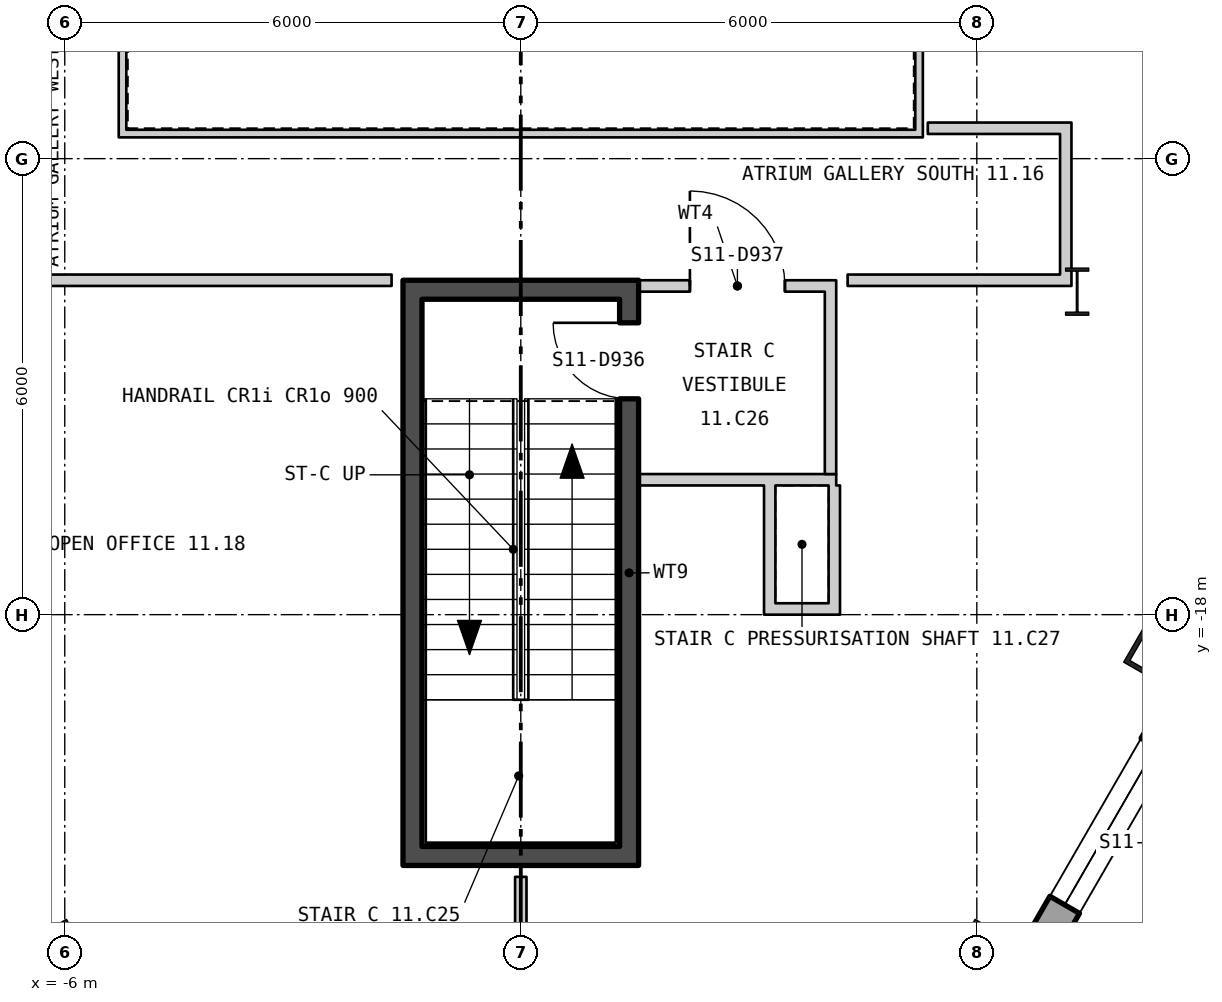
"""IFC4 building model, lengths in metres.
Left out: names, types, materials, properties, quantities, classifications, styles, units other than length and angle.
Written with IfcOpenShell. Run it as: python <this file> out.ifc"""

import sys

from ifc_helpers import new_model, si_unit, direction, frame, frame_2d, origin, origin_2d, place, context, subcontext, project, spatial, polyline, rectangle, hollow_rectangle, i_section, outline, extrude, element, fill, save


model = new_model("IFC4")
c1 = context("Model", 3, precision=1e-05, world=origin(), true_north=direction((0.0, 1.0)))
c2 = subcontext(c1, "Body", "Model", "MODEL_VIEW")
j1 = project(units=[si_unit("LENGTHUNIT", "METRE"), si_unit("PLANEANGLEUNIT", "RADIAN")], contexts=[c1])
p1 = place(None, origin())
s1 = spatial("IfcSite", under=j1, at=p1, CompositionType="ELEMENT")
p2 = place(p1, origin())
s2 = spatial("IfcBuilding", under=s1, at=p2, CompositionType="ELEMENT")
p3 = place(p2, frame((0.0, 0.0, 151.5)))
s3 = spatial("IfcBuildingStorey", under=s2, at=p3, CompositionType="ELEMENT", Elevation=151.5)
for number, where, z_axis, x_axis in (
    (1, (-6.131, -22.443, 0.0), (0.0, 0.0, 1.0), (0.5, -0.866, 0.0)),
    (2, (6.131, -22.443, 0.0), (0.0, 0.0, 1.0), (0.5, 0.866, 0.0)),
    (3, (8.385, -18.54, 0.0), (0.0, 0.0, 1.0), (0.5, 0.866, 0.0)),
):
    element("IfcColumn", number, at=place(p3, frame(where, z_axis=z_axis, x_axis=x_axis)), inside=s3, PredefinedType="COLUMN", context=c2, shape_type="SweptSolid", body=[
        extrude(hollow_rectangle(XDim=0.6, YDim=0.7, WallThickness=0.06, at=origin_2d()), origin(), (0.0, 0.0, 1.0), 3.9),
    ])
p4 = place(p3, frame((7.32, -13.75, 0.0), z_axis=(0.0, 0.0, 1.0), x_axis=(1.0, 0.0, 0.0)))
e4 = element("IfcColumn", 4, at=p4, inside=s3, PredefinedType="COLUMN", context=c2, shape_type="SweptSolid", body=[
    extrude(i_section(OverallWidth=0.305, OverallDepth=0.62, WebThickness=0.021, FlangeThickness=0.04, at=origin_2d()), origin(), (0.0, 0.0, 1.0), 3.9),
])
p5 = place(p3, frame((-27.075, 12.683, -0.18), z_axis=(0.0, 0.0, 1.0), x_axis=(0.500000141277, -0.866025322218, 0.0)))
e5 = element("IfcWall", 5, at=p5, inside=s3, PredefinedType="SOLIDWALL", context=c2, shape_type="SweptSolid", body=[
    extrude(outline(polyline([(-0.13, -0.225), (45.86, -0.225), (45.6, 0.225), (0.13, 0.225), (-0.13, -0.225)])), origin(), (0.0, 0.0, 1.0), 3.68),
])
p6 = place(p5, frame((1.424, 0.0, 1.08)))
e6 = element("IfcOpeningElement", 6, at=p6, cuts=e5, PredefinedType="OPENING", context=c2, shape_type="SweptSolid", body=[
    extrude(rectangle(XDim=2.4, YDim=2.0, at=frame_2d((1.2, 1.0))), frame((0.0, 0.235, 0.0), z_axis=(0.0, -1.0, 0.0), x_axis=(1.0, 0.0, 0.0)), (0.0, 0.0, 1.0), 0.47),
])
p7 = place(p5, frame((5.892, 0.0, 1.08)))
e7 = element("IfcOpeningElement", 7, at=p7, cuts=e5, PredefinedType="OPENING", context=c2, shape_type="SweptSolid", body=[
    extrude(rectangle(XDim=2.4, YDim=2.0, at=frame_2d((1.2, 1.0))), frame((0.0, 0.235, 0.0), z_axis=(0.0, -1.0, 0.0), x_axis=(1.0, 0.0, 0.0)), (0.0, 0.0, 1.0), 0.47),
])
p8 = place(p5, frame((10.399, 0.0, 1.08)))
e8 = element("IfcOpeningElement", 8, at=p8, cuts=e5, PredefinedType="OPENING", context=c2, shape_type="SweptSolid", body=[
    extrude(rectangle(XDim=2.4, YDim=2.0, at=frame_2d((1.2, 1.0))), frame((0.0, 0.235, 0.0), z_axis=(0.0, -1.0, 0.0), x_axis=(1.0, 0.0, 0.0)), (0.0, 0.0, 1.0), 0.47),
])
p9 = place(p5, frame((14.905, 0.0, 1.08)))
e9 = element("IfcOpeningElement", 9, at=p9, cuts=e5, PredefinedType="OPENING", context=c2, shape_type="SweptSolid", body=[
    extrude(rectangle(XDim=2.4, YDim=2.0, at=frame_2d((1.2, 1.0))), frame((0.0, 0.235, 0.0), z_axis=(0.0, -1.0, 0.0), x_axis=(1.0, 0.0, 0.0)), (0.0, 0.0, 1.0), 0.47),
])
p10 = place(p5, frame((19.412, 0.0, 1.08)))
e10 = element("IfcOpeningElement", 10, at=p10, cuts=e5, PredefinedType="OPENING", context=c2, shape_type="SweptSolid", body=[
    extrude(rectangle(XDim=2.4, YDim=2.0, at=frame_2d((1.2, 1.0))), frame((0.0, 0.235, 0.0), z_axis=(0.0, -1.0, 0.0), x_axis=(1.0, 0.0, 0.0)), (0.0, 0.0, 1.0), 0.47),
])
p11 = place(p5, frame((23.918, 0.0, 1.08)))
e11 = element("IfcOpeningElement", 11, at=p11, cuts=e5, PredefinedType="OPENING", context=c2, shape_type="SweptSolid", body=[
    extrude(rectangle(XDim=2.4, YDim=2.0, at=frame_2d((1.2, 1.0))), frame((0.0, 0.235, 0.0), z_axis=(0.0, -1.0, 0.0), x_axis=(1.0, 0.0, 0.0)), (0.0, 0.0, 1.0), 0.47),
])
p12 = place(p5, frame((28.425, 0.0, 1.08)))
e12 = element("IfcOpeningElement", 12, at=p12, cuts=e5, PredefinedType="OPENING", context=c2, shape_type="SweptSolid", body=[
    extrude(rectangle(XDim=2.4, YDim=2.0, at=frame_2d((1.2, 1.0))), frame((0.0, 0.235, 0.0), z_axis=(0.0, -1.0, 0.0), x_axis=(1.0, 0.0, 0.0)), (0.0, 0.0, 1.0), 0.47),
])
p13 = place(p5, frame((32.932, 0.0, 1.08)))
e13 = element("IfcOpeningElement", 13, at=p13, cuts=e5, PredefinedType="OPENING", context=c2, shape_type="SweptSolid", body=[
    extrude(rectangle(XDim=2.4, YDim=2.0, at=frame_2d((1.2, 1.0))), frame((0.0, 0.235, 0.0), z_axis=(0.0, -1.0, 0.0), x_axis=(1.0, 0.0, 0.0)), (0.0, 0.0, 1.0), 0.47),
])
p14 = place(p5, frame((37.438, 0.0, 1.08)))
e14 = element("IfcOpeningElement", 14, at=p14, cuts=e5, PredefinedType="OPENING", context=c2, shape_type="SweptSolid", body=[
    extrude(rectangle(XDim=2.4, YDim=2.0, at=frame_2d((1.2, 1.0))), frame((0.0, 0.235, 0.0), z_axis=(0.0, -1.0, 0.0), x_axis=(1.0, 0.0, 0.0)), (0.0, 0.0, 1.0), 0.47),
])
p15 = place(p5, frame((41.907, 0.0, 1.08)))
e15 = element("IfcOpeningElement", 15, at=p15, cuts=e5, PredefinedType="OPENING", context=c2, shape_type="SweptSolid", body=[
    extrude(rectangle(XDim=2.4, YDim=2.0, at=frame_2d((1.2, 1.0))), frame((0.0, 0.235, 0.0), z_axis=(0.0, -1.0, 0.0), x_axis=(1.0, 0.0, 0.0)), (0.0, 0.0, 1.0), 0.47),
])
p16 = place(p3, frame((4.21, -26.921, -0.18), z_axis=(0.0, 0.0, 1.0), x_axis=(0.500000141277, 0.866025322218, 0.0)))
e16 = element("IfcWall", 16, at=p16, inside=s3, PredefinedType="SOLIDWALL", context=c2, shape_type="SweptSolid", body=[
    extrude(outline(polyline([(-0.13, -0.225), (45.86, -0.225), (45.6, 0.225), (0.13, 0.225), (-0.13, -0.225)])), origin(), (0.0, 0.0, 1.0), 3.68),
])
p17 = place(p16, frame((1.424, 0.0, 1.08)))
e17 = element("IfcOpeningElement", 17, at=p17, cuts=e16, PredefinedType="OPENING", context=c2, shape_type="SweptSolid", body=[
    extrude(rectangle(XDim=2.4, YDim=2.0, at=frame_2d((1.2, 1.0))), frame((0.0, 0.235, 0.0), z_axis=(0.0, -1.0, 0.0), x_axis=(1.0, 0.0, 0.0)), (0.0, 0.0, 1.0), 0.47),
])
p18 = place(p16, frame((5.892, 0.0, 1.08)))
e18 = element("IfcOpeningElement", 18, at=p18, cuts=e16, PredefinedType="OPENING", context=c2, shape_type="SweptSolid", body=[
    extrude(rectangle(XDim=2.4, YDim=2.0, at=frame_2d((1.2, 1.0))), frame((0.0, 0.235, 0.0), z_axis=(0.0, -1.0, 0.0), x_axis=(1.0, 0.0, 0.0)), (0.0, 0.0, 1.0), 0.47),
])
p19 = place(p16, frame((10.399, 0.0, 1.08)))
e19 = element("IfcOpeningElement", 19, at=p19, cuts=e16, PredefinedType="OPENING", context=c2, shape_type="SweptSolid", body=[
    extrude(rectangle(XDim=2.4, YDim=2.0, at=frame_2d((1.2, 1.0))), frame((0.0, 0.235, 0.0), z_axis=(0.0, -1.0, 0.0), x_axis=(1.0, 0.0, 0.0)), (0.0, 0.0, 1.0), 0.47),
])
p20 = place(p16, frame((14.905, 0.0, 1.08)))
e20 = element("IfcOpeningElement", 20, at=p20, cuts=e16, PredefinedType="OPENING", context=c2, shape_type="SweptSolid", body=[
    extrude(rectangle(XDim=2.4, YDim=2.0, at=frame_2d((1.2, 1.0))), frame((0.0, 0.235, 0.0), z_axis=(0.0, -1.0, 0.0), x_axis=(1.0, 0.0, 0.0)), (0.0, 0.0, 1.0), 0.47),
])
p21 = place(p16, frame((19.412, 0.0, 1.08)))
e21 = element("IfcOpeningElement", 21, at=p21, cuts=e16, PredefinedType="OPENING", context=c2, shape_type="SweptSolid", body=[
    extrude(rectangle(XDim=2.4, YDim=2.0, at=frame_2d((1.2, 1.0))), frame((0.0, 0.235, 0.0), z_axis=(0.0, -1.0, 0.0), x_axis=(1.0, 0.0, 0.0)), (0.0, 0.0, 1.0), 0.47),
])
p22 = place(p16, frame((23.918, 0.0, 1.08)))
e22 = element("IfcOpeningElement", 22, at=p22, cuts=e16, PredefinedType="OPENING", context=c2, shape_type="SweptSolid", body=[
    extrude(rectangle(XDim=2.4, YDim=2.0, at=frame_2d((1.2, 1.0))), frame((0.0, 0.235, 0.0), z_axis=(0.0, -1.0, 0.0), x_axis=(1.0, 0.0, 0.0)), (0.0, 0.0, 1.0), 0.47),
])
p23 = place(p16, frame((37.438, 0.0, 1.08)))
e23 = element("IfcOpeningElement", 23, at=p23, cuts=e16, PredefinedType="OPENING", context=c2, shape_type="SweptSolid", body=[
    extrude(rectangle(XDim=2.4, YDim=2.0, at=frame_2d((1.2, 1.0))), frame((0.0, 0.235, 0.0), z_axis=(0.0, -1.0, 0.0), x_axis=(1.0, 0.0, 0.0)), (0.0, 0.0, 1.0), 0.47),
])
p24 = place(p16, frame((41.907, 0.0, 1.08)))
e24 = element("IfcOpeningElement", 24, at=p24, cuts=e16, PredefinedType="OPENING", context=c2, shape_type="SweptSolid", body=[
    extrude(rectangle(XDim=2.4, YDim=2.0, at=frame_2d((1.2, 1.0))), frame((0.0, 0.235, 0.0), z_axis=(0.0, -1.0, 0.0), x_axis=(1.0, 0.0, 0.0)), (0.0, 0.0, 1.0), 0.47),
])
p25 = place(p3, frame((-5.29, -11.67, 0.0), z_axis=(0.0, 0.0, 1.0), x_axis=(1.0, 0.0, 0.0)))
e25 = element("IfcWall", 25, at=p25, inside=s3, PredefinedType="PARTITIONING", context=c2, shape_type="SweptSolid", body=[
    extrude(rectangle(XDim=10.58, YDim=0.1, at=frame_2d((5.29, 0.0))), origin(), (0.0, 0.0, 1.0), 3.7),
])
for number, where, z_axis, x_axis in (
    (26, (5.24, -11.62, 0.0), (0.0, 0.0, 1.0), (0.0, 1.0, 0.0)),
    (27, (-5.24, -3.58, 0.0), (0.0, 0.0, 1.0), (0.0, -1.0, 0.0)),
):
    element("IfcWall", number, at=place(p3, frame(where, z_axis=z_axis, x_axis=x_axis)), inside=s3, PredefinedType="PARTITIONING", context=c2, shape_type="SweptSolid", body=[
        extrude(rectangle(XDim=8.04, YDim=0.1, at=frame_2d((4.02, 0.0))), origin(), (0.0, 0.0, 1.0), 3.7),
    ])
p26 = place(p3, frame((-1.425, -21.05, 0.0), z_axis=(0.0, 0.0, 1.0), x_axis=(0.0, 1.0, 0.0)))
e28 = element("IfcWall", 28, at=p26, inside=s3, PredefinedType="SHEAR", context=c2, shape_type="SweptSolid", body=[
    extrude(rectangle(XDim=7.2, YDim=0.25, at=frame_2d((3.6, 0.0))), origin(), (0.0, 0.0, 1.0), 3.7),
])
p27 = place(p3, frame((1.425, -21.05, 0.0), z_axis=(0.0, 0.0, 1.0), x_axis=(0.0, 1.0, 0.0)))
e29 = element("IfcWall", 29, at=p27, inside=s3, PredefinedType="SHEAR", context=c2, shape_type="SweptSolid", body=[
    extrude(rectangle(XDim=7.2, YDim=0.25, at=frame_2d((3.6, 0.0))), origin(), (0.0, 0.0, 1.0), 3.7),
])
p28 = place(p27, frame((5.89, 0.0, 0.0)))
e30 = element("IfcOpeningElement", 30, at=p28, cuts=e29, PredefinedType="OPENING", context=c2, shape_type="SweptSolid", body=[
    extrude(rectangle(XDim=1.0, YDim=2.1, at=frame_2d((0.5, 1.05))), frame((0.0, 0.135, 0.0), z_axis=(0.0, -1.0, 0.0), x_axis=(1.0, 0.0, 0.0)), (0.0, 0.0, 1.0), 0.27),
])
for number, where, z_axis, x_axis in (
    (31, (-1.55, -21.175, 0.0), (0.0, 0.0, 1.0), (1.0, 0.0, 0.0)),
    (32, (-1.55, -13.725, 0.0), (0.0, 0.0, 1.0), (1.0, 0.0, 0.0)),
):
    element("IfcWall", number, at=place(p3, frame(where, z_axis=z_axis, x_axis=x_axis)), inside=s3, PredefinedType="SHEAR", context=c2, shape_type="SweptSolid", body=[
        extrude(rectangle(XDim=3.1, YDim=0.25, at=frame_2d((1.55, 0.0))), origin(), (0.0, 0.0, 1.0), 3.7),
    ])
p29 = place(p3, frame((1.55, -16.225, 0.0), z_axis=(0.0, 0.0, 1.0), x_axis=(1.0, 0.0, 0.0)))
e33 = element("IfcWall", 33, at=p29, inside=s3, PredefinedType="PARTITIONING", context=c2, shape_type="SweptSolid", body=[
    extrude(rectangle(XDim=2.6, YDim=0.15, at=frame_2d((1.3, 0.0))), origin(), (0.0, 0.0, 1.0), 3.7),
])
p30 = place(p3, frame((4.075, -16.15, 0.0), z_axis=(0.0, 0.0, 1.0), x_axis=(0.0, 1.0, 0.0)))
e34 = element("IfcWall", 34, at=p30, inside=s3, PredefinedType="PARTITIONING", context=c2, shape_type="SweptSolid", body=[
    extrude(rectangle(XDim=2.4, YDim=0.15, at=frame_2d((1.2, 0.0))), origin(), (0.0, 0.0, 1.0), 3.7),
])
p31 = place(p3, frame((1.55, -13.675, 0.0), z_axis=(0.0, 0.0, 1.0), x_axis=(1.0, 0.0, 0.0)))
e35 = element("IfcWall", 35, at=p31, inside=s3, PredefinedType="PARTITIONING", context=c2, shape_type="SweptSolid", body=[
    extrude(rectangle(XDim=2.6, YDim=0.15, at=frame_2d((1.3, 0.0))), origin(), (0.0, 0.0, 1.0), 2.886),
])
p32 = place(p31, frame((0.675, 0.0, 0.0)))
e36 = element("IfcOpeningElement", 36, at=p32, cuts=e35, PredefinedType="OPENING", context=c2, shape_type="SweptSolid", body=[
    extrude(rectangle(XDim=1.25, YDim=2.1, at=frame_2d((0.625, 1.05))), frame((0.0, 0.085, 0.0), z_axis=(0.0, -1.0, 0.0), x_axis=(1.0, 0.0, 0.0)), (0.0, 0.0, 1.0), 0.17),
])
p33 = place(p3, frame((3.275, -18.0, 0.0), z_axis=(0.0, 0.0, 1.0), x_axis=(0.0, 1.0, 0.0)))
e37 = element("IfcWall", 37, at=p33, inside=s3, PredefinedType="PARTITIONING", context=c2, shape_type="SweptSolid", body=[
    extrude(rectangle(XDim=1.7, YDim=0.15, at=frame_2d((0.85, 0.0))), origin(), (0.0, 0.0, 1.0), 3.01),
])
p34 = place(p3, frame((3.35, -17.925, 0.0), z_axis=(0.0, 0.0, 1.0), x_axis=(1.0, 0.0, 0.0)))
e38 = element("IfcWall", 38, at=p34, inside=s3, PredefinedType="PARTITIONING", context=c2, shape_type="SweptSolid", body=[
    extrude(rectangle(XDim=0.7, YDim=0.15, at=frame_2d((0.35, 0.0))), origin(), (0.0, 0.0, 1.0), 3.7),
])
p35 = place(p3, frame((4.125, -18.0, 0.0), z_axis=(0.0, 0.0, 1.0), x_axis=(0.0, 1.0, 0.0)))
e39 = element("IfcWall", 39, at=p35, inside=s3, PredefinedType="PARTITIONING", context=c2, shape_type="SweptSolid", body=[
    extrude(rectangle(XDim=1.7, YDim=0.15, at=frame_2d((0.85, 0.0))), origin(), (0.0, 0.0, 1.0), 3.7),
])
p36 = place(p3, frame((-7.095, -13.6, 0.0), z_axis=(0.0, 0.0, 1.0), x_axis=(1.0, 0.0, 0.0)))
e40 = element("IfcWall", 40, at=p36, inside=s3, PredefinedType="PARTITIONING", context=c2, shape_type="SweptSolid", body=[
    extrude(rectangle(XDim=5.395, YDim=0.15, at=frame_2d((2.697, 0.0))), origin(), (0.0, 0.0, 1.0), 2.886),
])
p37 = place(p3, frame((0.0, -26.246, 0.0), z_axis=(0.0, 0.0, 1.0), x_axis=(0.0, 1.0, 0.0)))
e41 = element("IfcWall", 41, at=p37, inside=s3, PredefinedType="PARTITIONING", context=c2, shape_type="SweptSolid", body=[
    extrude(rectangle(XDim=4.796, YDim=0.15, at=frame_2d((2.398, 0.0))), origin(), (0.0, 0.0, 1.0), 3.15),
])
p38 = place(p3, frame((4.3, -13.6, 0.0), z_axis=(0.0, 0.0, 1.0), x_axis=(1.0, 0.0, 0.0)))
e42 = element("IfcWall", 42, at=p38, inside=s3, PredefinedType="PARTITIONING", context=c2, shape_type="SweptSolid", body=[
    extrude(rectangle(XDim=2.945, YDim=0.15, at=frame_2d((1.472, 0.0))), origin(), (0.0, 0.0, 1.0), 2.886),
])
p39 = place(p3, frame((5.355, -11.6, 0.0), z_axis=(0.0, 0.0, 1.0), x_axis=(1.0, 0.0, 0.0)))
e43 = element("IfcWall", 43, at=p39, inside=s3, PredefinedType="PARTITIONING", context=c2, shape_type="SweptSolid", body=[
    extrude(rectangle(XDim=1.74, YDim=0.15, at=frame_2d((0.87, 0.0))), origin(), (0.0, 0.0, 1.0), 3.7),
])
p40 = place(p3, frame((7.17, -13.525, 0.0), z_axis=(0.0, 0.0, 1.0), x_axis=(0.0, 1.0, 0.0)))
e44 = element("IfcWall", 44, at=p40, inside=s3, PredefinedType="PARTITIONING", context=c2, shape_type="SweptSolid", body=[
    extrude(rectangle(XDim=2.0, YDim=0.15, at=frame_2d((1.0, 0.0))), origin(), (0.0, 0.0, 1.0), 3.11),
])
p41 = place(p18, origin())
e45 = element("IfcWindow", 45, at=p41, inside=s3, PartitioningType="SINGLE_PANEL", PredefinedType="WINDOW", context=c2, shape_type="SweptSolid", body=[
    extrude(rectangle(XDim=2.4, YDim=2.0, at=frame_2d((1.2, 1.0))), frame((0.0, 0.105, 0.0), z_axis=(0.0, -1.0, 0.0), x_axis=(1.0, 0.0, 0.0)), (0.0, 0.0, 1.0), 0.06),
])
fill(e18, e45)
p42 = place(p28, origin())
e46 = element("IfcDoor", 46, at=p42, inside=s3, OperationType="SINGLE_SWING_LEFT", PredefinedType="DOOR", context=c2, shape_type="SweptSolid", body=[
    extrude(rectangle(XDim=1.0, YDim=2.1, at=frame_2d((0.5, 1.05))), frame((0.0, 0.025, 0.0), z_axis=(0.0, -1.0, 0.0), x_axis=(1.0, 0.0, 0.0)), (0.0, 0.0, 1.0), 0.05),
])
fill(e30, e46)
p43 = place(p32, origin())
e47 = element("IfcDoor", 47, at=p43, inside=s3, OperationType="SINGLE_SWING_RIGHT", PredefinedType="DOOR", context=c2, shape_type="SweptSolid", body=[
    extrude(rectangle(XDim=1.25, YDim=2.1, at=frame_2d((0.625, 1.05))), frame((0.0, 0.025, 0.0), z_axis=(0.0, -1.0, 0.0), x_axis=(1.0, 0.0, 0.0)), (0.0, 0.0, 1.0), 0.05),
])
fill(e36, e47)
save(model, sys.argv[1])
